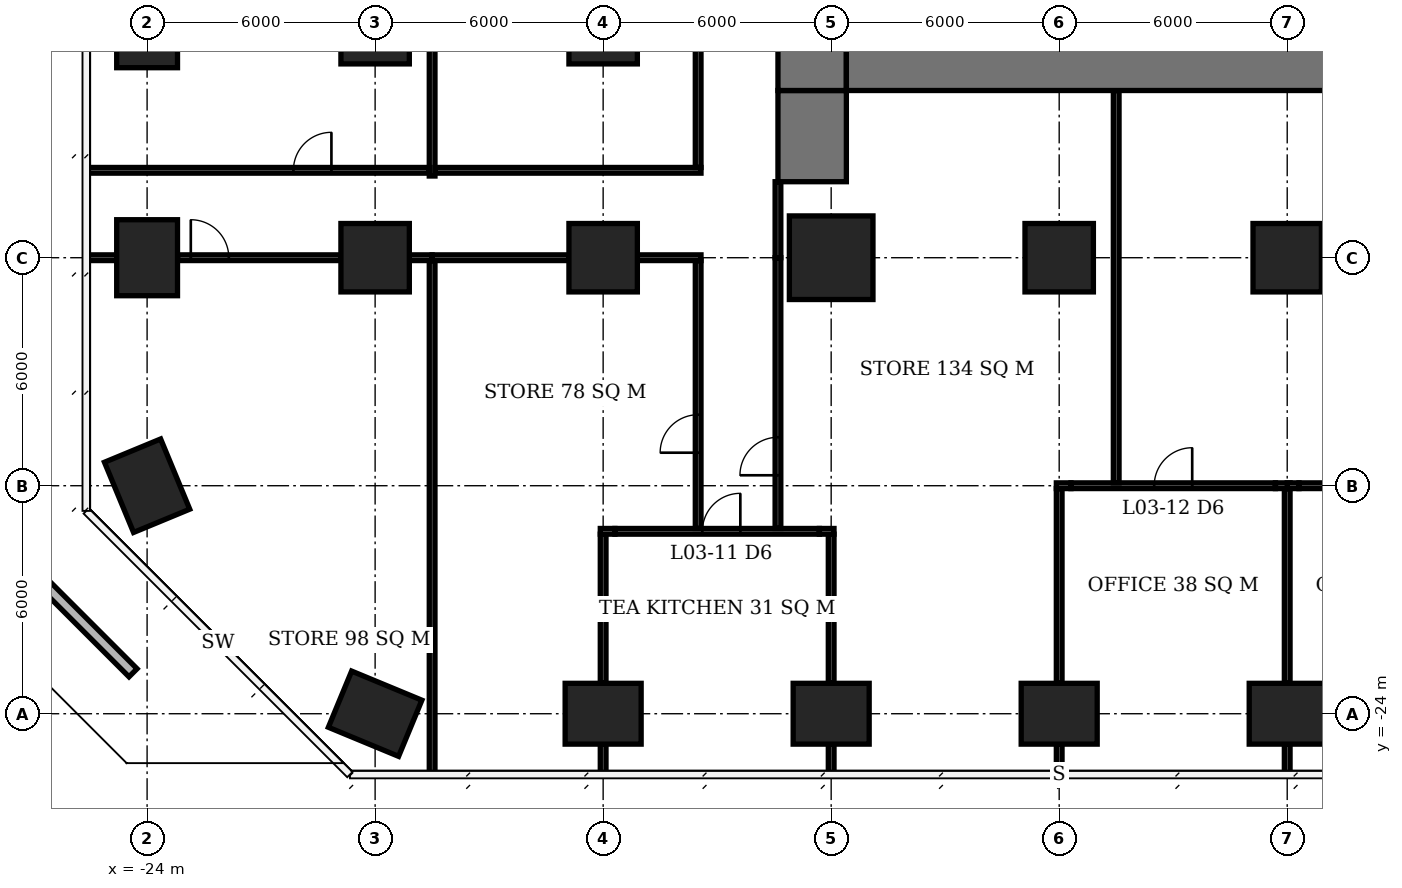
"""IFC4 building model, lengths in metres.
Left out: names, types, materials, properties, quantities, classifications, styles, units other than length and angle.
Written with IfcOpenShell. Run it as: python <this file> out.ifc"""

import sys

from ifc_helpers import new_model, si_unit, direction, frame, frame_2d, origin, origin_2d, place, context, subcontext, project, spatial, rectangle, extrude, element, fill, save


model = new_model("IFC4")
c1 = context("Model", 3, precision=1e-05, world=origin(), true_north=direction((0.0, 1.0)))
c2 = subcontext(c1, "Body", "Model", "MODEL_VIEW")
j1 = project(units=[si_unit("LENGTHUNIT", "METRE"), si_unit("PLANEANGLEUNIT", "RADIAN")], contexts=[c1])
p1 = place(None, origin())
s1 = spatial("IfcSite", under=j1, at=p1, CompositionType="ELEMENT")
p2 = place(p1, origin())
s2 = spatial("IfcBuilding", under=s1, at=p2, CompositionType="ELEMENT")
p3 = place(p2, frame((0.0, 0.0, 18.2)))
s3 = spatial("IfcBuildingStorey", under=s2, at=p3, CompositionType="ELEMENT", Elevation=18.2)
for number, where, z_axis, x_axis in (
    (1, (-24.0, -18.0, 0.0), (0.0, 0.0, 1.0), (-0.383, 0.924, 0.0)),
    (2, (-24.0, -12.0, 0.0), (0.0, 0.0, 1.0), (0.0, 1.0, 0.0)),
    (3, (-24.0, -6.0, 0.0), (0.0, 0.0, 1.0), (0.0, 1.0, 0.0)),
    (4, (-18.0, -24.0, 0.0), (0.0, 0.0, 1.0), (-0.924, 0.383, 0.0)),
):
    element("IfcColumn", number, at=place(p3, frame(where, z_axis=z_axis, x_axis=x_axis)), inside=s3, PredefinedType="COLUMN", context=c2, shape_type="SweptSolid", body=[
        extrude(rectangle(XDim=2.0, YDim=1.6, at=origin_2d()), origin(), (0.0, 0.0, 1.0), 3.9),
    ])
for number, where, z_axis, x_axis in (
    (5, (-18.0, -12.0, 0.0), (0.0, 0.0, 1.0), (1.0, 0.0, 0.0)),
    (6, (-18.0, -6.0, 0.0), (0.0, 0.0, 1.0), (1.0, 0.0, 0.0)),
):
    element("IfcColumn", number, at=place(p3, frame(where, z_axis=z_axis, x_axis=x_axis)), inside=s3, PredefinedType="COLUMN", context=c2, shape_type="SweptSolid", body=[
        extrude(rectangle(XDim=1.8, YDim=1.8, at=origin_2d()), origin(), (0.0, 0.0, 1.0), 3.9),
    ])
p4 = place(p3, frame((-12.0, -24.0, 0.0), z_axis=(0.0, 0.0, 1.0), x_axis=(1.0, 0.0, 0.0)))
e7 = element("IfcColumn", 7, at=p4, inside=s3, PredefinedType="COLUMN", context=c2, shape_type="SweptSolid", body=[
    extrude(rectangle(XDim=2.0, YDim=1.6, at=origin_2d()), origin(), (0.0, 0.0, 1.0), 3.9),
])
for number, where, z_axis, x_axis in (
    (8, (-12.0, -12.0, 0.0), (0.0, 0.0, 1.0), (1.0, 0.0, 0.0)),
    (9, (-12.0, -6.0, 0.0), (0.0, 0.0, 1.0), (1.0, 0.0, 0.0)),
):
    element("IfcColumn", number, at=place(p3, frame(where, z_axis=z_axis, x_axis=x_axis)), inside=s3, PredefinedType="COLUMN", context=c2, shape_type="SweptSolid", body=[
        extrude(rectangle(XDim=1.8, YDim=1.8, at=origin_2d()), origin(), (0.0, 0.0, 1.0), 3.9),
    ])
p5 = place(p3, frame((-6.0, -24.0, 0.0), z_axis=(0.0, 0.0, 1.0), x_axis=(1.0, 0.0, 0.0)))
e10 = element("IfcColumn", 10, at=p5, inside=s3, PredefinedType="COLUMN", context=c2, shape_type="SweptSolid", body=[
    extrude(rectangle(XDim=2.0, YDim=1.6, at=origin_2d()), origin(), (0.0, 0.0, 1.0), 3.9),
])
p6 = place(p3, frame((-6.0, -12.0, 0.0), z_axis=(0.0, 0.0, 1.0), x_axis=(1.0, 0.0, 0.0)))
e11 = element("IfcColumn", 11, at=p6, inside=s3, PredefinedType="COLUMN", context=c2, shape_type="SweptSolid", body=[
    extrude(rectangle(XDim=2.2, YDim=2.2, at=origin_2d()), origin(), (0.0, 0.0, 1.0), 3.9),
])
p7 = place(p3, frame((0.0, -24.0, 0.0), z_axis=(0.0, 0.0, 1.0), x_axis=(1.0, 0.0, 0.0)))
e12 = element("IfcColumn", 12, at=p7, inside=s3, PredefinedType="COLUMN", context=c2, shape_type="SweptSolid", body=[
    extrude(rectangle(XDim=2.0, YDim=1.6, at=origin_2d()), origin(), (0.0, 0.0, 1.0), 3.9),
])
p8 = place(p3, frame((0.0, -12.0, 0.0), z_axis=(0.0, 0.0, 1.0), x_axis=(1.0, 0.0, 0.0)))
e13 = element("IfcColumn", 13, at=p8, inside=s3, PredefinedType="COLUMN", context=c2, shape_type="SweptSolid", body=[
    extrude(rectangle(XDim=1.8, YDim=1.8, at=origin_2d()), origin(), (0.0, 0.0, 1.0), 3.9),
])
p9 = place(p3, frame((6.0, -24.0, 0.0), z_axis=(0.0, 0.0, 1.0), x_axis=(1.0, 0.0, 0.0)))
e14 = element("IfcColumn", 14, at=p9, inside=s3, PredefinedType="COLUMN", context=c2, shape_type="SweptSolid", body=[
    extrude(rectangle(XDim=2.0, YDim=1.6, at=origin_2d()), origin(), (0.0, 0.0, 1.0), 3.9),
])
p10 = place(p3, frame((6.0, -12.0, 0.0), z_axis=(0.0, 0.0, 1.0), x_axis=(1.0, 0.0, 0.0)))
e15 = element("IfcColumn", 15, at=p10, inside=s3, PredefinedType="COLUMN", context=c2, shape_type="SweptSolid", body=[
    extrude(rectangle(XDim=1.8, YDim=1.8, at=origin_2d()), origin(), (0.0, 0.0, 1.0), 3.9),
])
p11 = place(p3, frame((-5.6, -6.6, 0.0), z_axis=(0.0, 0.0, 1.0), x_axis=(1.0, 0.0, 0.0)))
e16 = element("IfcWall", 16, at=p11, inside=s3, PredefinedType="SHEAR", context=c2, shape_type="SweptSolid", body=[
    extrude(rectangle(XDim=23.2, YDim=2.0, at=frame_2d((11.6, 0.0))), origin(), (0.0, 0.0, 1.0), 3.9),
])
p12 = place(p3, frame((-6.5, -7.6, 0.0), z_axis=(0.0, 0.0, 1.0), x_axis=(0.0, 1.0, 0.0)))
e17 = element("IfcWall", 17, at=p12, inside=s3, PredefinedType="SHEAR", context=c2, shape_type="SweptSolid", body=[
    extrude(rectangle(XDim=21.2, YDim=1.8, at=frame_2d((10.6, 0.0))), origin(), (0.0, 0.0, 1.0), 3.9),
])
p13 = place(p12, frame((7.8, 0.0, 0.0)))
e18 = element("IfcOpeningElement", 18, at=p13, cuts=e17, PredefinedType="OPENING", context=c2, shape_type="SweptSolid", body=[
    extrude(rectangle(XDim=1.8, YDim=2.4, at=frame_2d((0.9, 1.2))), frame((0.0, 0.91, 0.0), z_axis=(0.0, -1.0, 0.0), x_axis=(1.0, 0.0, 0.0)), (0.0, 0.0, 1.0), 1.82),
])
p14 = place(p3, frame((-6.5, -10.0, 0.0), z_axis=(0.0, 0.0, 1.0), x_axis=(0.0, 1.0, 0.0)))
e19 = element("IfcWall", 19, at=p14, inside=s3, PredefinedType="SHEAR", context=c2, shape_type="SweptSolid", body=[
    extrude(rectangle(XDim=2.4, YDim=1.8, at=frame_2d((1.2, 0.0))), origin(), (0.0, 0.0, 1.0), 3.9),
])
p15 = place(p3, frame((-24.37, -22.923, 0.0), z_axis=(0.0, 0.0, 1.0), x_axis=(-0.707106781187, 0.707106781187, 0.0)))
e20 = element("IfcWall", 20, at=p15, inside=s3, PredefinedType="USERDEFINED", context=c2, shape_type="SweptSolid", body=[
    extrude(rectangle(XDim=6.438, YDim=0.3, at=frame_2d((3.219, 0.0))), origin(), (0.0, 0.0, 1.0), 0.6),
])
p16 = place(p3, frame((-12.075, -19.2, 0.0), z_axis=(0.0, 0.0, 1.0), x_axis=(1.0, 0.0, 0.0)))
e21 = element("IfcWall", 21, at=p16, inside=s3, PredefinedType="PARTITIONING", context=c2, shape_type="SweptSolid", body=[
    extrude(rectangle(XDim=0.385, YDim=0.15, at=frame_2d((0.192, 0.0))), origin(), (0.0, 0.0, 1.0), 3.05),
])
p17 = place(p3, frame((-11.69, -19.2, 0.0), z_axis=(0.0, 0.0, 1.0), x_axis=(1.0, 0.0, 0.0)))
e22 = element("IfcWall", 22, at=p17, inside=s3, PredefinedType="PARTITIONING", context=c2, shape_type="SweptSolid", body=[
    extrude(rectangle(XDim=5.38, YDim=0.15, at=frame_2d((2.69, 0.0))), origin(), (0.0, 0.0, 1.0), 3.65),
])
p18 = place(p17, frame((2.3, 0.0, 0.0)))
e23 = element("IfcOpeningElement", 23, at=p18, cuts=e22, PredefinedType="OPENING", context=c2, shape_type="SweptSolid", body=[
    extrude(rectangle(XDim=1.0, YDim=2.1, at=frame_2d((0.5, 1.05))), frame((0.0, 0.085, 0.0), z_axis=(0.0, -1.0, 0.0), x_axis=(1.0, 0.0, 0.0)), (0.0, 0.0, 1.0), 0.17),
])
for number, where, z_axis, x_axis in (
    (24, (-6.31, -19.2, 0.0), (0.0, 0.0, 1.0), (1.0, 0.0, 0.0)),
    (25, (-0.075, -18.0, 0.0), (0.0, 0.0, 1.0), (1.0, 0.0, 0.0)),
):
    element("IfcWall", number, at=place(p3, frame(where, z_axis=z_axis, x_axis=x_axis)), inside=s3, PredefinedType="PARTITIONING", context=c2, shape_type="SweptSolid", body=[
        extrude(rectangle(XDim=0.385, YDim=0.15, at=frame_2d((0.192, 0.0))), origin(), (0.0, 0.0, 1.0), 3.05),
    ])
p19 = place(p3, frame((0.31, -18.0, 0.0), z_axis=(0.0, 0.0, 1.0), x_axis=(1.0, 0.0, 0.0)))
e26 = element("IfcWall", 26, at=p19, inside=s3, PredefinedType="PARTITIONING", context=c2, shape_type="SweptSolid", body=[
    extrude(rectangle(XDim=5.38, YDim=0.15, at=frame_2d((2.69, 0.0))), origin(), (0.0, 0.0, 1.0), 3.65),
])
p20 = place(p19, frame((2.19, 0.0, 0.0)))
e27 = element("IfcOpeningElement", 27, at=p20, cuts=e26, PredefinedType="OPENING", context=c2, shape_type="SweptSolid", body=[
    extrude(rectangle(XDim=1.0, YDim=2.1, at=frame_2d((0.5, 1.05))), frame((0.0, 0.085, 0.0), z_axis=(0.0, -1.0, 0.0), x_axis=(1.0, 0.0, 0.0)), (0.0, 0.0, 1.0), 0.17),
])
p21 = place(p3, frame((5.69, -18.0, 0.0), z_axis=(0.0, 0.0, 1.0), x_axis=(1.0, 0.0, 0.0)))
e28 = element("IfcWall", 28, at=p21, inside=s3, PredefinedType="PARTITIONING", context=c2, shape_type="SweptSolid", body=[
    extrude(rectangle(XDim=0.385, YDim=0.15, at=frame_2d((0.192, 0.0))), origin(), (0.0, 0.0, 1.0), 3.05),
])
p22 = place(p3, frame((6.0, -18.0, 0.0), z_axis=(0.0, 0.0, 1.0), x_axis=(1.0, 0.0, 0.0)))
e29 = element("IfcWall", 29, at=p22, inside=s3, PredefinedType="PARTITIONING", context=c2, shape_type="SweptSolid", body=[
    extrude(rectangle(XDim=0.31, YDim=0.15, at=frame_2d((0.155, 0.0))), origin(), (0.0, 0.0, 1.0), 3.05),
])
p23 = place(p3, frame((6.31, -18.0, 0.0), z_axis=(0.0, 0.0, 1.0), x_axis=(1.0, 0.0, 0.0)))
e30 = element("IfcWall", 30, at=p23, inside=s3, PredefinedType="PARTITIONING", context=c2, shape_type="SweptSolid", body=[
    extrude(rectangle(XDim=5.38, YDim=0.15, at=frame_2d((2.69, 0.0))), origin(), (0.0, 0.0, 1.0), 3.65),
])
p24 = place(p23, frame((2.19, 0.0, 0.0)))
e31 = element("IfcOpeningElement", 31, at=p24, cuts=e30, PredefinedType="OPENING", context=c2, shape_type="SweptSolid", body=[
    extrude(rectangle(XDim=1.0, YDim=2.1, at=frame_2d((0.5, 1.05))), frame((0.0, 0.085, 0.0), z_axis=(0.0, -1.0, 0.0), x_axis=(1.0, 0.0, 0.0)), (0.0, 0.0, 1.0), 0.17),
])
p25 = place(p3, frame((-12.0, -25.6, 0.0), z_axis=(0.0, 0.0, 1.0), x_axis=(0.0, 1.0, 0.0)))
e32 = element("IfcWall", 32, at=p25, inside=s3, PredefinedType="PARTITIONING", context=c2, shape_type="SweptSolid", body=[
    extrude(rectangle(XDim=0.8, YDim=0.15, at=frame_2d((0.4, 0.0))), origin(), (0.0, 0.0, 1.0), 3.65),
])
p26 = place(p3, frame((-12.0, -23.2, 0.0), z_axis=(0.0, 0.0, 1.0), x_axis=(0.0, 1.0, 0.0)))
e33 = element("IfcWall", 33, at=p26, inside=s3, PredefinedType="PARTITIONING", context=c2, shape_type="SweptSolid", body=[
    extrude(rectangle(XDim=3.925, YDim=0.15, at=frame_2d((1.962, 0.0))), origin(), (0.0, 0.0, 1.0), 3.05),
])
p27 = place(p3, frame((-6.0, -25.6, 0.0), z_axis=(0.0, 0.0, 1.0), x_axis=(0.0, 1.0, 0.0)))
e34 = element("IfcWall", 34, at=p27, inside=s3, PredefinedType="PARTITIONING", context=c2, shape_type="SweptSolid", body=[
    extrude(rectangle(XDim=0.8, YDim=0.15, at=frame_2d((0.4, 0.0))), origin(), (0.0, 0.0, 1.0), 3.65),
])
p28 = place(p3, frame((-6.0, -23.2, 0.0), z_axis=(0.0, 0.0, 1.0), x_axis=(0.0, 1.0, 0.0)))
e35 = element("IfcWall", 35, at=p28, inside=s3, PredefinedType="PARTITIONING", context=c2, shape_type="SweptSolid", body=[
    extrude(rectangle(XDim=3.925, YDim=0.15, at=frame_2d((1.962, 0.0))), origin(), (0.0, 0.0, 1.0), 3.05),
])
p29 = place(p3, frame((0.0, -25.55, 0.0), z_axis=(0.0, 0.0, 1.0), x_axis=(0.0, 1.0, 0.0)))
e36 = element("IfcWall", 36, at=p29, inside=s3, PredefinedType="PARTITIONING", context=c2, shape_type="SweptSolid", body=[
    extrude(rectangle(XDim=0.75, YDim=0.15, at=frame_2d((0.375, 0.0))), origin(), (0.0, 0.0, 1.0), 3.65),
])
p30 = place(p3, frame((0.0, -23.2, 0.0), z_axis=(0.0, 0.0, 1.0), x_axis=(0.0, 1.0, 0.0)))
e37 = element("IfcWall", 37, at=p30, inside=s3, PredefinedType="PARTITIONING", context=c2, shape_type="SweptSolid", body=[
    extrude(rectangle(XDim=5.125, YDim=0.15, at=frame_2d((2.562, 0.0))), origin(), (0.0, 0.0, 1.0), 3.05),
])
p31 = place(p3, frame((6.0, -25.6, 0.0), z_axis=(0.0, 0.0, 1.0), x_axis=(0.0, 1.0, 0.0)))
e38 = element("IfcWall", 38, at=p31, inside=s3, PredefinedType="PARTITIONING", context=c2, shape_type="SweptSolid", body=[
    extrude(rectangle(XDim=0.8, YDim=0.15, at=frame_2d((0.4, 0.0))), origin(), (0.0, 0.0, 1.0), 3.65),
])
p32 = place(p3, frame((6.0, -23.2, 0.0), z_axis=(0.0, 0.0, 1.0), x_axis=(0.0, 1.0, 0.0)))
e39 = element("IfcWall", 39, at=p32, inside=s3, PredefinedType="PARTITIONING", context=c2, shape_type="SweptSolid", body=[
    extrude(rectangle(XDim=5.125, YDim=0.15, at=frame_2d((2.562, 0.0))), origin(), (0.0, 0.0, 1.0), 3.05),
])
p33 = place(p3, frame((-25.6, -12.0, 0.0), z_axis=(0.0, 0.0, 1.0), x_axis=(1.0, 0.0, 0.0)))
e40 = element("IfcWall", 40, at=p33, inside=s3, PredefinedType="PARTITIONING", context=c2, shape_type="SweptSolid", body=[
    extrude(rectangle(XDim=0.8, YDim=0.15, at=frame_2d((0.4, 0.0))), origin(), (0.0, 0.0, 1.0), 3.65),
])
p34 = place(p3, frame((-23.2, -12.0, 0.0), z_axis=(0.0, 0.0, 1.0), x_axis=(1.0, 0.0, 0.0)))
e41 = element("IfcWall", 41, at=p34, inside=s3, PredefinedType="PARTITIONING", context=c2, shape_type="SweptSolid", body=[
    extrude(rectangle(XDim=4.3, YDim=0.15, at=frame_2d((2.15, 0.0))), origin(), (0.0, 0.0, 1.0), 3.65),
])
p35 = place(p34, frame((0.35, 0.0, 0.0)))
e42 = element("IfcOpeningElement", 42, at=p35, cuts=e41, PredefinedType="OPENING", context=c2, shape_type="SweptSolid", body=[
    extrude(rectangle(XDim=1.0, YDim=2.1, at=frame_2d((0.5, 1.05))), frame((0.0, 0.085, 0.0), z_axis=(0.0, -1.0, 0.0), x_axis=(1.0, 0.0, 0.0)), (0.0, 0.0, 1.0), 0.17),
])
p36 = place(p3, frame((-17.1, -12.0, 0.0), z_axis=(0.0, 0.0, 1.0), x_axis=(1.0, 0.0, 0.0)))
e43 = element("IfcWall", 43, at=p36, inside=s3, PredefinedType="PARTITIONING", context=c2, shape_type="SweptSolid", body=[
    extrude(rectangle(XDim=0.6, YDim=0.15, at=frame_2d((0.3, 0.0))), origin(), (0.0, 0.0, 1.0), 3.65),
])
p37 = place(p3, frame((-25.6, -9.7, 0.0), z_axis=(0.0, 0.0, 1.0), x_axis=(1.0, 0.0, 0.0)))
e44 = element("IfcWall", 44, at=p37, inside=s3, PredefinedType="PARTITIONING", context=c2, shape_type="SweptSolid", body=[
    extrude(rectangle(XDim=9.025, YDim=0.15, at=frame_2d((4.513, 0.0))), origin(), (0.0, 0.0, 1.0), 3.65),
])
p38 = place(p37, frame((5.45, 0.0, 0.0)))
e45 = element("IfcOpeningElement", 45, at=p38, cuts=e44, PredefinedType="OPENING", context=c2, shape_type="SweptSolid", body=[
    extrude(rectangle(XDim=1.0, YDim=2.1, at=frame_2d((0.5, 1.05))), frame((0.0, 0.085, 0.0), z_axis=(0.0, -1.0, 0.0), x_axis=(1.0, 0.0, 0.0)), (0.0, 0.0, 1.0), 0.17),
])
p39 = place(p3, frame((-16.5, -25.6, 0.0), z_axis=(0.0, 0.0, 1.0), x_axis=(0.0, 1.0, 0.0)))
e46 = element("IfcWall", 46, at=p39, inside=s3, PredefinedType="PARTITIONING", context=c2, shape_type="SweptSolid", body=[
    extrude(rectangle(XDim=13.525, YDim=0.15, at=frame_2d((6.763, 0.0))), origin(), (0.0, 0.0, 1.0), 3.65),
])
p40 = place(p3, frame((-16.5, -12.0, 0.0), z_axis=(0.0, 0.0, 1.0), x_axis=(1.0, 0.0, 0.0)))
e47 = element("IfcWall", 47, at=p40, inside=s3, PredefinedType="PARTITIONING", context=c2, shape_type="SweptSolid", body=[
    extrude(rectangle(XDim=3.6, YDim=0.15, at=frame_2d((1.8, 0.0))), origin(), (0.0, 0.0, 1.0), 3.65),
])
p41 = place(p3, frame((-11.1, -12.0, 0.0), z_axis=(0.0, 0.0, 1.0), x_axis=(1.0, 0.0, 0.0)))
e48 = element("IfcWall", 48, at=p41, inside=s3, PredefinedType="PARTITIONING", context=c2, shape_type="SweptSolid", body=[
    extrude(rectangle(XDim=1.675, YDim=0.15, at=frame_2d((0.837, 0.0))), origin(), (0.0, 0.0, 1.0), 3.65),
])
p42 = place(p3, frame((-16.5, -9.85, 0.0), z_axis=(0.0, 0.0, 1.0), x_axis=(0.0, 1.0, 0.0)))
e49 = element("IfcWall", 49, at=p42, inside=s3, PredefinedType="PARTITIONING", context=c2, shape_type="SweptSolid", body=[
    extrude(rectangle(XDim=14.275, YDim=0.15, at=frame_2d((7.138, 0.0))), origin(), (0.0, 0.0, 1.0), 3.65),
])
p43 = place(p3, frame((-16.425, -9.7, 0.0), z_axis=(0.0, 0.0, 1.0), x_axis=(1.0, 0.0, 0.0)))
e50 = element("IfcWall", 50, at=p43, inside=s3, PredefinedType="PARTITIONING", context=c2, shape_type="SweptSolid", body=[
    extrude(rectangle(XDim=7.0, YDim=0.15, at=frame_2d((3.5, 0.0))), origin(), (0.0, 0.0, 1.0), 3.65),
])
p44 = place(p3, frame((-9.5, -19.125, 0.0), z_axis=(0.0, 0.0, 1.0), x_axis=(0.0, 1.0, 0.0)))
e51 = element("IfcWall", 51, at=p44, inside=s3, PredefinedType="PARTITIONING", context=c2, shape_type="SweptSolid", body=[
    extrude(rectangle(XDim=7.05, YDim=0.15, at=frame_2d((3.525, 0.0))), origin(), (0.0, 0.0, 1.0), 3.65),
])
p45 = place(p44, frame((1.994, 0.0, 0.0)))
e52 = element("IfcOpeningElement", 52, at=p45, cuts=e51, PredefinedType="OPENING", context=c2, shape_type="SweptSolid", body=[
    extrude(rectangle(XDim=1.0, YDim=2.1, at=frame_2d((0.5, 1.05))), frame((0.0, 0.085, 0.0), z_axis=(0.0, -1.0, 0.0), x_axis=(1.0, 0.0, 0.0)), (0.0, 0.0, 1.0), 0.17),
])
p46 = place(p3, frame((-9.5, -9.625, 0.0), z_axis=(0.0, 0.0, 1.0), x_axis=(0.0, 1.0, 0.0)))
e53 = element("IfcWall", 53, at=p46, inside=s3, PredefinedType="PARTITIONING", context=c2, shape_type="SweptSolid", body=[
    extrude(rectangle(XDim=14.05, YDim=0.15, at=frame_2d((7.025, 0.0))), origin(), (0.0, 0.0, 1.0), 3.65),
])
p47 = place(p46, frame((4.395, 0.0, 0.0)))
e54 = element("IfcOpeningElement", 54, at=p47, cuts=e53, PredefinedType="OPENING", context=c2, shape_type="SweptSolid", body=[
    extrude(rectangle(XDim=1.0, YDim=2.1, at=frame_2d((0.5, 1.05))), frame((0.0, 0.085, 0.0), z_axis=(0.0, -1.0, 0.0), x_axis=(1.0, 0.0, 0.0)), (0.0, 0.0, 1.0), 0.17),
])
p48 = place(p3, frame((-7.4, -19.125, 0.0), z_axis=(0.0, 0.0, 1.0), x_axis=(0.0, 1.0, 0.0)))
e55 = element("IfcWall", 55, at=p48, inside=s3, PredefinedType="PARTITIONING", context=c2, shape_type="SweptSolid", body=[
    extrude(rectangle(XDim=7.125, YDim=0.15, at=frame_2d((3.562, 0.0))), origin(), (0.0, 0.0, 1.0), 3.65),
])
p49 = place(p48, frame((1.4, 0.0, 0.0)))
e56 = element("IfcOpeningElement", 56, at=p49, cuts=e55, PredefinedType="OPENING", context=c2, shape_type="SweptSolid", body=[
    extrude(rectangle(XDim=1.0, YDim=2.1, at=frame_2d((0.5, 1.05))), frame((0.0, 0.085, 0.0), z_axis=(0.0, -1.0, 0.0), x_axis=(1.0, 0.0, 0.0)), (0.0, 0.0, 1.0), 0.17),
])
p50 = place(p3, frame((-7.4, -12.0, 0.0), z_axis=(0.0, 0.0, 1.0), x_axis=(0.0, 1.0, 0.0)))
e57 = element("IfcWall", 57, at=p50, inside=s3, PredefinedType="PARTITIONING", context=c2, shape_type="SweptSolid", body=[
    extrude(rectangle(XDim=2.0, YDim=0.15, at=frame_2d((1.0, 0.0))), origin(), (0.0, 0.0, 1.0), 3.65),
])
p51 = place(p3, frame((1.5, -17.925, 0.0), z_axis=(0.0, 0.0, 1.0), x_axis=(0.0, 1.0, 0.0)))
e58 = element("IfcWall", 58, at=p51, inside=s3, PredefinedType="PARTITIONING", context=c2, shape_type="SweptSolid", body=[
    extrude(rectangle(XDim=10.325, YDim=0.15, at=frame_2d((5.163, 0.0))), origin(), (0.0, 0.0, 1.0), 3.65),
])
p52 = place(p18, origin())
e59 = element("IfcDoor", 59, at=p52, inside=s3, OperationType="SINGLE_SWING_RIGHT", PredefinedType="DOOR", context=c2, shape_type="SweptSolid", body=[
    extrude(rectangle(XDim=1.0, YDim=2.1, at=frame_2d((0.5, 1.05))), frame((0.0, 0.025, 0.0), z_axis=(0.0, -1.0, 0.0), x_axis=(1.0, 0.0, 0.0)), (0.0, 0.0, 1.0), 0.05),
])
fill(e23, e59)
p53 = place(p20, origin())
e60 = element("IfcDoor", 60, at=p53, inside=s3, OperationType="SINGLE_SWING_RIGHT", PredefinedType="DOOR", context=c2, shape_type="SweptSolid", body=[
    extrude(rectangle(XDim=1.0, YDim=2.1, at=frame_2d((0.5, 1.05))), frame((0.0, 0.025, 0.0), z_axis=(0.0, -1.0, 0.0), x_axis=(1.0, 0.0, 0.0)), (0.0, 0.0, 1.0), 0.05),
])
fill(e27, e60)
p54 = place(p45, origin())
e61 = element("IfcDoor", 61, at=p54, inside=s3, OperationType="SINGLE_SWING_LEFT", PredefinedType="DOOR", context=c2, shape_type="SweptSolid", body=[
    extrude(rectangle(XDim=1.0, YDim=2.1, at=frame_2d((0.5, 1.05))), frame((0.0, 0.025, 0.0), z_axis=(0.0, -1.0, 0.0), x_axis=(1.0, 0.0, 0.0)), (0.0, 0.0, 1.0), 0.05),
])
fill(e52, e61)
p55 = place(p35, origin())
e62 = element("IfcDoor", 62, at=p55, inside=s3, OperationType="SINGLE_SWING_LEFT", PredefinedType="DOOR", context=c2, shape_type="SweptSolid", body=[
    extrude(rectangle(XDim=1.0, YDim=2.1, at=frame_2d((0.5, 1.05))), frame((0.0, 0.025, 0.0), z_axis=(0.0, -1.0, 0.0), x_axis=(1.0, 0.0, 0.0)), (0.0, 0.0, 1.0), 0.05),
])
fill(e42, e62)
p56 = place(p38, origin())
e63 = element("IfcDoor", 63, at=p56, inside=s3, OperationType="SINGLE_SWING_RIGHT", PredefinedType="DOOR", context=c2, shape_type="SweptSolid", body=[
    extrude(rectangle(XDim=1.0, YDim=2.1, at=frame_2d((0.5, 1.05))), frame((0.0, 0.025, 0.0), z_axis=(0.0, -1.0, 0.0), x_axis=(1.0, 0.0, 0.0)), (0.0, 0.0, 1.0), 0.05),
])
fill(e45, e63)
p57 = place(p49, origin())
e64 = element("IfcDoor", 64, at=p57, inside=s3, OperationType="SINGLE_SWING_LEFT", PredefinedType="DOOR", context=c2, shape_type="SweptSolid", body=[
    extrude(rectangle(XDim=1.0, YDim=2.1, at=frame_2d((0.5, 1.05))), frame((0.0, 0.025, 0.0), z_axis=(0.0, -1.0, 0.0), x_axis=(1.0, 0.0, 0.0)), (0.0, 0.0, 1.0), 0.05),
])
fill(e56, e64)
save(model, sys.argv[1])
